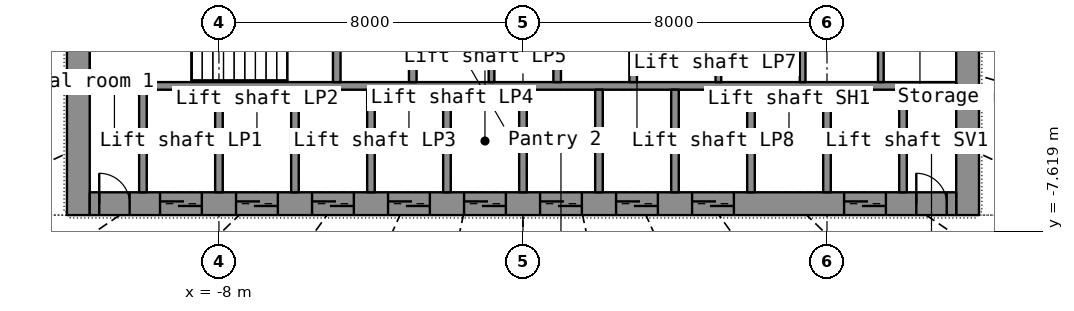
"""IFC4 building model, lengths in metres.
Left out: names, types, materials, properties, quantities, classifications, styles, units other than length and angle.
Written with IfcOpenShell. Run it as: python <this file> out.ifc"""

import sys

from ifc_helpers import new_model, si_unit, direction, frame, frame_2d, origin, place, context, subcontext, project, spatial, rectangle, extrude, element, fill, save


model = new_model("IFC4")
c1 = context("Model", 3, precision=1e-05, world=origin(), true_north=direction((0.0, 1.0)))
c2 = subcontext(c1, "Body", "Model", "MODEL_VIEW")
j1 = project(units=[si_unit("LENGTHUNIT", "METRE"), si_unit("PLANEANGLEUNIT", "RADIAN")], contexts=[c1])
p1 = place(None, origin())
s1 = spatial("IfcSite", under=j1, at=p1, CompositionType="ELEMENT")
p2 = place(p1, origin())
s2 = spatial("IfcBuilding", under=s1, at=p2, CompositionType="ELEMENT")
p3 = place(p2, frame((0.0, 0.0, 7.0)))
s3 = spatial("IfcBuildingStorey", under=s2, at=p3, CompositionType="ELEMENT", Elevation=7.0)
p4 = place(p3, frame((-11.7, -7.2, 0.0), z_axis=(0.0, 0.0, 1.0), x_axis=(0.0, 1.0, 0.0)))
e1 = element("IfcWall", 1, at=p4, inside=s3, PredefinedType="SHEAR", context=c2, shape_type="SweptSolid", body=[
    extrude(rectangle(XDim=14.4, YDim=0.6, at=frame_2d((7.2, 0.0))), origin(), (0.0, 0.0, 1.0), 6.1),
])
p5 = place(p4, frame((6.5, 0.0, 0.0)))
e2 = element("IfcOpeningElement", 2, at=p5, cuts=e1, PredefinedType="OPENING", context=c2, shape_type="SweptSolid", body=[
    extrude(rectangle(XDim=1.4, YDim=2.2, at=frame_2d((0.7, 1.1))), frame((0.0, 0.31, 0.0), z_axis=(0.0, -1.0, 0.0), x_axis=(1.0, 0.0, 0.0)), (0.0, 0.0, 1.0), 0.62),
])
p6 = place(p3, frame((11.7, -7.2, 0.0), z_axis=(0.0, 0.0, 1.0), x_axis=(0.0, 1.0, 0.0)))
e3 = element("IfcWall", 3, at=p6, inside=s3, PredefinedType="SHEAR", context=c2, shape_type="SweptSolid", body=[
    extrude(rectangle(XDim=14.4, YDim=0.6, at=frame_2d((7.2, 0.0))), origin(), (0.0, 0.0, 1.0), 6.1),
])
p7 = place(p6, frame((6.5, 0.0, 0.0)))
e4 = element("IfcOpeningElement", 4, at=p7, cuts=e3, PredefinedType="OPENING", context=c2, shape_type="SweptSolid", body=[
    extrude(rectangle(XDim=1.4, YDim=2.2, at=frame_2d((0.7, 1.1))), frame((0.0, 0.31, 0.0), z_axis=(0.0, -1.0, 0.0), x_axis=(1.0, 0.0, 0.0)), (0.0, 0.0, 1.0), 0.62),
])
p8 = place(p3, frame((-11.4, -6.9, 0.0), z_axis=(0.0, 0.0, 1.0), x_axis=(1.0, 0.0, 0.0)))
e5 = element("IfcWall", 5, at=p8, inside=s3, PredefinedType="SHEAR", context=c2, shape_type="SweptSolid", body=[
    extrude(rectangle(XDim=22.8, YDim=0.6, at=frame_2d((11.4, 0.0))), origin(), (0.0, 0.0, 1.0), 6.1),
])
p9 = place(p8, frame((1.85, 0.0, 0.0)))
e6 = element("IfcOpeningElement", 6, at=p9, cuts=e5, PredefinedType="OPENING", context=c2, shape_type="SweptSolid", body=[
    extrude(rectangle(XDim=1.1, YDim=2.2, at=frame_2d((0.55, 1.1))), frame((0.0, 0.31, 0.0), z_axis=(0.0, -1.0, 0.0), x_axis=(1.0, 0.0, 0.0)), (0.0, 0.0, 1.0), 0.62),
])
p10 = place(p8, frame((3.85, 0.0, 0.0)))
e7 = element("IfcOpeningElement", 7, at=p10, cuts=e5, PredefinedType="OPENING", context=c2, shape_type="SweptSolid", body=[
    extrude(rectangle(XDim=1.1, YDim=2.2, at=frame_2d((0.55, 1.1))), frame((0.0, 0.31, 0.0), z_axis=(0.0, -1.0, 0.0), x_axis=(1.0, 0.0, 0.0)), (0.0, 0.0, 1.0), 0.62),
])
p11 = place(p8, frame((5.85, 0.0, 0.0)))
e8 = element("IfcOpeningElement", 8, at=p11, cuts=e5, PredefinedType="OPENING", context=c2, shape_type="SweptSolid", body=[
    extrude(rectangle(XDim=1.1, YDim=2.2, at=frame_2d((0.55, 1.1))), frame((0.0, 0.31, 0.0), z_axis=(0.0, -1.0, 0.0), x_axis=(1.0, 0.0, 0.0)), (0.0, 0.0, 1.0), 0.62),
])
p12 = place(p8, frame((7.85, 0.0, 0.0)))
e9 = element("IfcOpeningElement", 9, at=p12, cuts=e5, PredefinedType="OPENING", context=c2, shape_type="SweptSolid", body=[
    extrude(rectangle(XDim=1.1, YDim=2.2, at=frame_2d((0.55, 1.1))), frame((0.0, 0.31, 0.0), z_axis=(0.0, -1.0, 0.0), x_axis=(1.0, 0.0, 0.0)), (0.0, 0.0, 1.0), 0.62),
])
p13 = place(p8, frame((9.85, 0.0, 0.0)))
e10 = element("IfcOpeningElement", 10, at=p13, cuts=e5, PredefinedType="OPENING", context=c2, shape_type="SweptSolid", body=[
    extrude(rectangle(XDim=1.1, YDim=2.2, at=frame_2d((0.55, 1.1))), frame((0.0, 0.31, 0.0), z_axis=(0.0, -1.0, 0.0), x_axis=(1.0, 0.0, 0.0)), (0.0, 0.0, 1.0), 0.62),
])
p14 = place(p8, frame((11.85, 0.0, 0.0)))
e11 = element("IfcOpeningElement", 11, at=p14, cuts=e5, PredefinedType="OPENING", context=c2, shape_type="SweptSolid", body=[
    extrude(rectangle(XDim=1.1, YDim=2.2, at=frame_2d((0.55, 1.1))), frame((0.0, 0.31, 0.0), z_axis=(0.0, -1.0, 0.0), x_axis=(1.0, 0.0, 0.0)), (0.0, 0.0, 1.0), 0.62),
])
p15 = place(p8, frame((13.85, 0.0, 0.0)))
e12 = element("IfcOpeningElement", 12, at=p15, cuts=e5, PredefinedType="OPENING", context=c2, shape_type="SweptSolid", body=[
    extrude(rectangle(XDim=1.1, YDim=2.2, at=frame_2d((0.55, 1.1))), frame((0.0, 0.31, 0.0), z_axis=(0.0, -1.0, 0.0), x_axis=(1.0, 0.0, 0.0)), (0.0, 0.0, 1.0), 0.62),
])
p16 = place(p8, frame((15.85, 0.0, 0.0)))
e13 = element("IfcOpeningElement", 13, at=p16, cuts=e5, PredefinedType="OPENING", context=c2, shape_type="SweptSolid", body=[
    extrude(rectangle(XDim=1.1, YDim=2.2, at=frame_2d((0.55, 1.1))), frame((0.0, 0.31, 0.0), z_axis=(0.0, -1.0, 0.0), x_axis=(1.0, 0.0, 0.0)), (0.0, 0.0, 1.0), 0.62),
])
p17 = place(p8, frame((19.85, 0.0, 0.0)))
e14 = element("IfcOpeningElement", 14, at=p17, cuts=e5, PredefinedType="OPENING", context=c2, shape_type="SweptSolid", body=[
    extrude(rectangle(XDim=1.1, YDim=2.2, at=frame_2d((0.55, 1.1))), frame((0.0, 0.31, 0.0), z_axis=(0.0, -1.0, 0.0), x_axis=(1.0, 0.0, 0.0)), (0.0, 0.0, 1.0), 0.62),
])
p18 = place(p8, frame((0.25, 0.0, 0.0)))
e15 = element("IfcOpeningElement", 15, at=p18, cuts=e5, PredefinedType="OPENING", context=c2, shape_type="SweptSolid", body=[
    extrude(rectangle(XDim=0.8, YDim=2.05, at=frame_2d((0.4, 1.025))), frame((0.0, 0.31, 0.0), z_axis=(0.0, -1.0, 0.0), x_axis=(1.0, 0.0, 0.0)), (0.0, 0.0, 1.0), 0.62),
])
p19 = place(p8, frame((21.75, 0.0, 0.0)))
e16 = element("IfcOpeningElement", 16, at=p19, cuts=e5, PredefinedType="OPENING", context=c2, shape_type="SweptSolid", body=[
    extrude(rectangle(XDim=0.8, YDim=2.05, at=frame_2d((0.4, 1.025))), frame((0.0, 0.31, 0.0), z_axis=(0.0, -1.0, 0.0), x_axis=(1.0, 0.0, 0.0)), (0.0, 0.0, 1.0), 0.62),
])
p20 = place(p3, frame((-11.4, -3.8, 0.0), z_axis=(0.0, 0.0, 1.0), x_axis=(1.0, 0.0, 0.0)))
e17 = element("IfcWall", 17, at=p20, inside=s3, PredefinedType="SHEAR", context=c2, shape_type="SweptSolid", body=[
    extrude(rectangle(XDim=22.8, YDim=0.2, at=frame_2d((11.4, 0.0))), origin(), (0.0, 0.0, 1.0), 6.1),
])
for number, where, z_axis, x_axis in (
    (18, (-10.0, -6.6, 0.0), (0.0, 0.0, 1.0), (0.0, 1.0, 0.0)),
    (19, (-8.0, -6.6, 0.0), (0.0, 0.0, 1.0), (0.0, 1.0, 0.0)),
    (20, (-6.0, -6.6, 0.0), (0.0, 0.0, 1.0), (0.0, 1.0, 0.0)),
    (21, (-4.0, -6.6, 0.0), (0.0, 0.0, 1.0), (0.0, 1.0, 0.0)),
    (22, (-2.0, -6.6, 0.0), (0.0, 0.0, 1.0), (0.0, 1.0, 0.0)),
    (23, (0.0, -6.6, 0.0), (0.0, 0.0, 1.0), (0.0, 1.0, 0.0)),
    (24, (2.0, -6.6, 0.0), (0.0, 0.0, 1.0), (0.0, 1.0, 0.0)),
    (25, (4.0, -6.6, 0.0), (0.0, 0.0, 1.0), (0.0, 1.0, 0.0)),
    (26, (6.0, -6.6, 0.0), (0.0, 0.0, 1.0), (0.0, 1.0, 0.0)),
    (27, (8.0, -6.6, 0.0), (0.0, 0.0, 1.0), (0.0, 1.0, 0.0)),
    (28, (10.0, -6.6, 0.0), (0.0, 0.0, 1.0), (0.0, 1.0, 0.0)),
):
    element("IfcWall", number, at=place(p3, frame(where, z_axis=z_axis, x_axis=x_axis)), inside=s3, PredefinedType="SHEAR", context=c2, shape_type="SweptSolid", body=[
        extrude(rectangle(XDim=2.7, YDim=0.2, at=frame_2d((1.35, 0.0))), origin(), (0.0, 0.0, 1.0), 6.1),
    ])
p21 = place(p3, frame((-2.9, -3.7, 0.0), z_axis=(0.0, 0.0, 1.0), x_axis=(0.0, 1.0, 0.0)))
e29 = element("IfcWall", 29, at=p21, inside=s3, PredefinedType="SHEAR", context=c2, shape_type="SweptSolid", body=[
    extrude(rectangle(XDim=7.4, YDim=0.2, at=frame_2d((3.7, 0.0))), origin(), (0.0, 0.0, 1.0), 6.1),
])
p22 = place(p21, frame((3.1, 0.0, 0.0)))
e30 = element("IfcOpeningElement", 30, at=p22, cuts=e29, PredefinedType="OPENING", context=c2, shape_type="SweptSolid", body=[
    extrude(rectangle(XDim=1.2, YDim=2.2, at=frame_2d((0.6, 1.1))), frame((0.0, 0.11, 0.0), z_axis=(0.0, -1.0, 0.0), x_axis=(1.0, 0.0, 0.0)), (0.0, 0.0, 1.0), 0.22),
])
p23 = place(p3, frame((2.9, -3.7, 0.0), z_axis=(0.0, 0.0, 1.0), x_axis=(0.0, 1.0, 0.0)))
e31 = element("IfcWall", 31, at=p23, inside=s3, PredefinedType="SHEAR", context=c2, shape_type="SweptSolid", body=[
    extrude(rectangle(XDim=7.4, YDim=0.2, at=frame_2d((3.7, 0.0))), origin(), (0.0, 0.0, 1.0), 6.1),
])
p24 = place(p23, frame((3.1, 0.0, 0.0)))
e32 = element("IfcOpeningElement", 32, at=p24, cuts=e31, PredefinedType="OPENING", context=c2, shape_type="SweptSolid", body=[
    extrude(rectangle(XDim=1.2, YDim=2.2, at=frame_2d((0.6, 1.1))), frame((0.0, 0.11, 0.0), z_axis=(0.0, -1.0, 0.0), x_axis=(1.0, 0.0, 0.0)), (0.0, 0.0, 1.0), 0.22),
])
for number, where, z_axis, x_axis in (
    (33, (0.9, -3.7, 0.0), (0.0, 0.0, 1.0), (0.0, 1.0, 0.0)),
    (34, (-4.9, -3.7, 0.0), (0.0, 0.0, 1.0), (0.0, 1.0, 0.0)),
):
    element("IfcWall", number, at=place(p3, frame(where, z_axis=z_axis, x_axis=x_axis)), inside=s3, PredefinedType="SHEAR", context=c2, shape_type="SweptSolid", body=[
        extrude(rectangle(XDim=2.35, YDim=0.2, at=frame_2d((1.175, 0.0))), origin(), (0.0, 0.0, 1.0), 6.1),
    ])
for number, where, z_axis, x_axis in (
    (35, (5.142, -3.7, 0.0), (0.0, 0.0, 1.0), (0.0, 1.0, 0.0)),
    (36, (7.359, -3.7, 0.0), (0.0, 0.0, 1.0), (0.0, 1.0, 0.0)),
    (37, (9.417, -3.7, 0.0), (0.0, 0.0, 1.0), (0.0, 1.0, 0.0)),
    (38, (-0.827, -3.7, 0.0), (0.0, 0.0, 1.0), (0.0, 1.0, 0.0)),
):
    element("IfcWall", number, at=place(p3, frame(where, z_axis=z_axis, x_axis=x_axis)), inside=s3, PredefinedType="PARTITIONING", context=c2, shape_type="SweptSolid", body=[
        extrude(rectangle(XDim=2.35, YDim=0.15, at=frame_2d((1.175, 0.0))), origin(), (0.0, 0.0, 1.0), 6.1),
    ])
p25 = place(p9, origin())
e39 = element("IfcDoor", 39, at=p25, inside=s3, OperationType="DOUBLE_DOOR_SLIDING", PredefinedType="DOOR", context=c2, shape_type="SweptSolid", body=[
    extrude(rectangle(XDim=1.1, YDim=2.2, at=frame_2d((0.55, 1.1))), frame((0.0, 0.025, 0.0), z_axis=(0.0, -1.0, 0.0), x_axis=(1.0, 0.0, 0.0)), (0.0, 0.0, 1.0), 0.05),
])
fill(e6, e39)
p26 = place(p10, origin())
e40 = element("IfcDoor", 40, at=p26, inside=s3, OperationType="DOUBLE_DOOR_SLIDING", PredefinedType="DOOR", context=c2, shape_type="SweptSolid", body=[
    extrude(rectangle(XDim=1.1, YDim=2.2, at=frame_2d((0.55, 1.1))), frame((0.0, 0.025, 0.0), z_axis=(0.0, -1.0, 0.0), x_axis=(1.0, 0.0, 0.0)), (0.0, 0.0, 1.0), 0.05),
])
fill(e7, e40)
p27 = place(p11, origin())
e41 = element("IfcDoor", 41, at=p27, inside=s3, OperationType="DOUBLE_DOOR_SLIDING", PredefinedType="DOOR", context=c2, shape_type="SweptSolid", body=[
    extrude(rectangle(XDim=1.1, YDim=2.2, at=frame_2d((0.55, 1.1))), frame((0.0, 0.025, 0.0), z_axis=(0.0, -1.0, 0.0), x_axis=(1.0, 0.0, 0.0)), (0.0, 0.0, 1.0), 0.05),
])
fill(e8, e41)
p28 = place(p12, origin())
e42 = element("IfcDoor", 42, at=p28, inside=s3, OperationType="DOUBLE_DOOR_SLIDING", PredefinedType="DOOR", context=c2, shape_type="SweptSolid", body=[
    extrude(rectangle(XDim=1.1, YDim=2.2, at=frame_2d((0.55, 1.1))), frame((0.0, 0.025, 0.0), z_axis=(0.0, -1.0, 0.0), x_axis=(1.0, 0.0, 0.0)), (0.0, 0.0, 1.0), 0.05),
])
fill(e9, e42)
p29 = place(p13, origin())
e43 = element("IfcDoor", 43, at=p29, inside=s3, OperationType="DOUBLE_DOOR_SLIDING", PredefinedType="DOOR", context=c2, shape_type="SweptSolid", body=[
    extrude(rectangle(XDim=1.1, YDim=2.2, at=frame_2d((0.55, 1.1))), frame((0.0, 0.025, 0.0), z_axis=(0.0, -1.0, 0.0), x_axis=(1.0, 0.0, 0.0)), (0.0, 0.0, 1.0), 0.05),
])
fill(e10, e43)
p30 = place(p14, origin())
e44 = element("IfcDoor", 44, at=p30, inside=s3, OperationType="DOUBLE_DOOR_SLIDING", PredefinedType="DOOR", context=c2, shape_type="SweptSolid", body=[
    extrude(rectangle(XDim=1.1, YDim=2.2, at=frame_2d((0.55, 1.1))), frame((0.0, 0.025, 0.0), z_axis=(0.0, -1.0, 0.0), x_axis=(1.0, 0.0, 0.0)), (0.0, 0.0, 1.0), 0.05),
])
fill(e11, e44)
p31 = place(p15, origin())
e45 = element("IfcDoor", 45, at=p31, inside=s3, OperationType="DOUBLE_DOOR_SLIDING", PredefinedType="DOOR", context=c2, shape_type="SweptSolid", body=[
    extrude(rectangle(XDim=1.1, YDim=2.2, at=frame_2d((0.55, 1.1))), frame((0.0, 0.025, 0.0), z_axis=(0.0, -1.0, 0.0), x_axis=(1.0, 0.0, 0.0)), (0.0, 0.0, 1.0), 0.05),
])
fill(e12, e45)
p32 = place(p16, origin())
e46 = element("IfcDoor", 46, at=p32, inside=s3, OperationType="DOUBLE_DOOR_SLIDING", PredefinedType="DOOR", context=c2, shape_type="SweptSolid", body=[
    extrude(rectangle(XDim=1.1, YDim=2.2, at=frame_2d((0.55, 1.1))), frame((0.0, 0.025, 0.0), z_axis=(0.0, -1.0, 0.0), x_axis=(1.0, 0.0, 0.0)), (0.0, 0.0, 1.0), 0.05),
])
fill(e13, e46)
p33 = place(p17, origin())
e47 = element("IfcDoor", 47, at=p33, inside=s3, OperationType="DOUBLE_DOOR_SLIDING", PredefinedType="DOOR", context=c2, shape_type="SweptSolid", body=[
    extrude(rectangle(XDim=1.1, YDim=2.2, at=frame_2d((0.55, 1.1))), frame((0.0, 0.025, 0.0), z_axis=(0.0, -1.0, 0.0), x_axis=(1.0, 0.0, 0.0)), (0.0, 0.0, 1.0), 0.05),
])
fill(e14, e47)
p34 = place(p18, origin())
e48 = element("IfcDoor", 48, at=p34, inside=s3, OperationType="SINGLE_SWING_LEFT", PredefinedType="DOOR", context=c2, shape_type="SweptSolid", body=[
    extrude(rectangle(XDim=0.8, YDim=2.05, at=frame_2d((0.4, 1.025))), frame((0.0, 0.025, 0.0), z_axis=(0.0, -1.0, 0.0), x_axis=(1.0, 0.0, 0.0)), (0.0, 0.0, 1.0), 0.05),
])
fill(e15, e48)
p35 = place(p19, origin())
e49 = element("IfcDoor", 49, at=p35, inside=s3, OperationType="SINGLE_SWING_LEFT", PredefinedType="DOOR", context=c2, shape_type="SweptSolid", body=[
    extrude(rectangle(XDim=0.8, YDim=2.05, at=frame_2d((0.4, 1.025))), frame((0.0, 0.025, 0.0), z_axis=(0.0, -1.0, 0.0), x_axis=(1.0, 0.0, 0.0)), (0.0, 0.0, 1.0), 0.05),
])
fill(e16, e49)
save(model, sys.argv[1])
